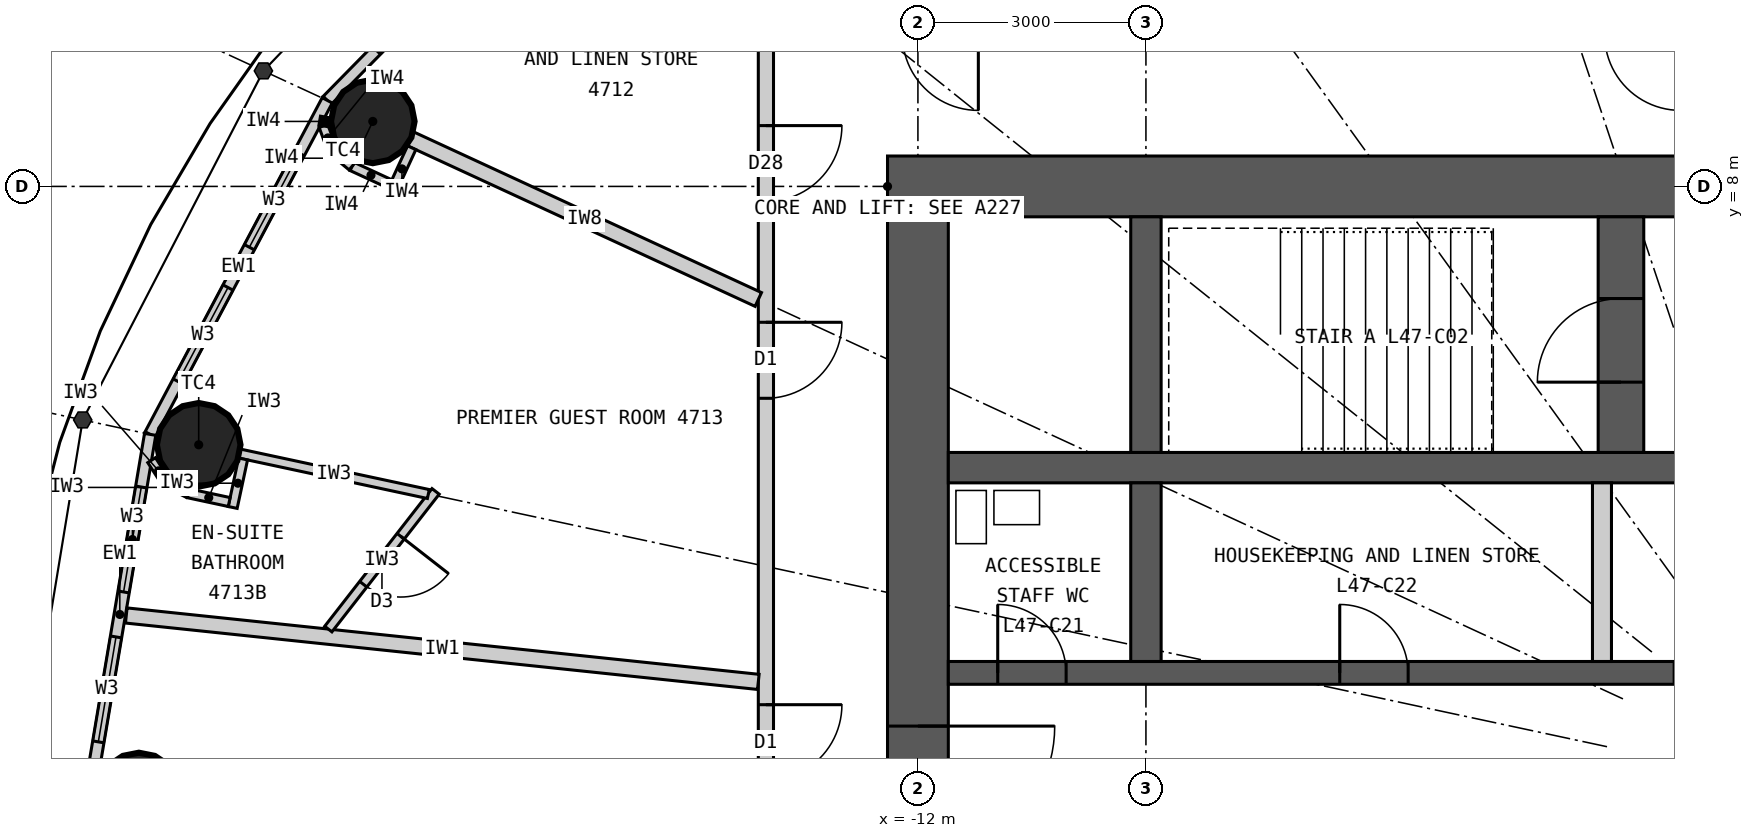
"""IFC4 building model, lengths in metres.
Left out: names, types, materials, properties, quantities, classifications, styles, units other than length and angle.
Written with IfcOpenShell. Run it as: python <this file> out.ifc"""

import sys

from ifc_helpers import new_model, si_unit, direction, frame, frame_2d, origin, origin_2d, place, context, subcontext, project, spatial, rectangle, circle, extrude, element, fill, save


model = new_model("IFC4")
c1 = context("Model", 3, precision=1e-05, world=origin(), true_north=direction((0.0, 1.0)))
c2 = subcontext(c1, "Body", "Model", "MODEL_VIEW")
j1 = project(units=[si_unit("LENGTHUNIT", "METRE"), si_unit("PLANEANGLEUNIT", "RADIAN")], contexts=[c1])
p1 = place(None, origin())
s1 = spatial("IfcSite", under=j1, at=p1, CompositionType="ELEMENT")
p2 = place(p1, origin())
s2 = spatial("IfcBuilding", under=s1, at=p2, CompositionType="ELEMENT")
p3 = place(p2, frame((0.0, 0.0, 176.4)))
s3 = spatial("IfcBuildingStorey", under=s2, at=p3, CompositionType="ELEMENT", Elevation=176.4)
for number, where, z_axis, x_axis in (
    (1, (-19.172, 8.855, 0.0), (0.0, 0.0, 1.0), (1.0, 0.0, 0.0)),
    (2, (-21.463, 4.601, 0.0), (0.0, 0.0, 1.0), (1.0, 0.0, 0.0)),
    (3, (-22.25, 0.0, 0.0), (0.0, 0.0, 1.0), (1.0, 0.0, 0.0)),
):
    element("IfcColumn", number, at=place(p3, frame(where, z_axis=z_axis, x_axis=x_axis)), inside=s3, PredefinedType="COLUMN", context=c2, shape_type="SweptSolid", body=[
        extrude(circle(Radius=0.55, at=origin_2d()), origin(), (0.0, 0.0, 1.0), 3.3),
    ])
p4 = place(p3, frame((-12.4, 8.0, 0.0), z_axis=(0.0, 0.0, 1.0), x_axis=(1.0, 0.0, 0.0)))
e4 = element("IfcWall", 4, at=p4, inside=s3, PredefinedType="SHEAR", context=c2, shape_type="SweptSolid", body=[
    extrude(rectangle(XDim=24.8, YDim=0.8, at=frame_2d((12.4, 0.0))), origin(), (0.0, 0.0, 1.0), 3.3),
])
p5 = place(p4, frame((11.1, 0.0, 0.0)))
e5 = element("IfcOpeningElement", 5, at=p5, cuts=e4, PredefinedType="OPENING", context=c2, shape_type="SweptSolid", body=[
    extrude(rectangle(XDim=1.2, YDim=2.2, at=frame_2d((0.6, 1.1))), frame((0.0, 0.41, 0.0), z_axis=(0.0, -1.0, 0.0), x_axis=(1.0, 0.0, 0.0)), (0.0, 0.0, 1.0), 0.82),
])
p6 = place(p4, frame((18.7, 0.0, 0.0)))
e6 = element("IfcOpeningElement", 6, at=p6, cuts=e4, PredefinedType="OPENING", context=c2, shape_type="SweptSolid", body=[
    extrude(rectangle(XDim=0.9, YDim=2.2, at=frame_2d((0.45, 1.1))), frame((0.0, 0.41, 0.0), z_axis=(0.0, -1.0, 0.0), x_axis=(1.0, 0.0, 0.0)), (0.0, 0.0, 1.0), 0.82),
])
p7 = place(p3, frame((-12.0, 7.6, 0.0), z_axis=(0.0, 0.0, 1.0), x_axis=(0.0, -1.0, 0.0)))
e7 = element("IfcWall", 7, at=p7, inside=s3, PredefinedType="SHEAR", context=c2, shape_type="SweptSolid", body=[
    extrude(rectangle(XDim=15.2, YDim=0.8, at=frame_2d((7.6, 0.0))), origin(), (0.0, 0.0, 1.0), 3.3),
])
p8 = place(p7, frame((6.7, 0.0, 0.0)))
e8 = element("IfcOpeningElement", 8, at=p8, cuts=e7, PredefinedType="OPENING", context=c2, shape_type="SweptSolid", body=[
    extrude(rectangle(XDim=1.8, YDim=2.2, at=frame_2d((0.9, 1.1))), frame((0.0, 0.41, 0.0), z_axis=(0.0, -1.0, 0.0), x_axis=(1.0, 0.0, 0.0)), (0.0, 0.0, 1.0), 0.82),
])
p9 = place(p3, frame((-11.6, 4.3, 0.0), z_axis=(0.0, 0.0, 1.0), x_axis=(1.0, 0.0, 0.0)))
e9 = element("IfcWall", 9, at=p9, inside=s3, PredefinedType="SHEAR", context=c2, shape_type="SweptSolid", body=[
    extrude(rectangle(XDim=23.2, YDim=0.4, at=frame_2d((11.6, 0.0))), origin(), (0.0, 0.0, 1.0), 3.3),
])
p10 = place(p3, frame((-11.6, 1.6, 0.0), z_axis=(0.0, 0.0, 1.0), x_axis=(1.0, 0.0, 0.0)))
e10 = element("IfcWall", 10, at=p10, inside=s3, PredefinedType="SHEAR", context=c2, shape_type="SweptSolid", body=[
    extrude(rectangle(XDim=23.2, YDim=0.3, at=frame_2d((11.6, 0.0))), origin(), (0.0, 0.0, 1.0), 3.3),
])
p11 = place(p10, frame((9.55, 0.0, 0.0)))
e11 = element("IfcOpeningElement", 11, at=p11, cuts=e10, PredefinedType="OPENING", context=c2, shape_type="SweptSolid", body=[
    extrude(rectangle(XDim=1.1, YDim=2.2, at=frame_2d((0.55, 1.1))), frame((0.0, 0.16, 0.0), z_axis=(0.0, -1.0, 0.0), x_axis=(1.0, 0.0, 0.0)), (0.0, 0.0, 1.0), 0.32),
])
p12 = place(p10, frame((12.55, 0.0, 0.0)))
e12 = element("IfcOpeningElement", 12, at=p12, cuts=e10, PredefinedType="OPENING", context=c2, shape_type="SweptSolid", body=[
    extrude(rectangle(XDim=1.1, YDim=2.2, at=frame_2d((0.55, 1.1))), frame((0.0, 0.16, 0.0), z_axis=(0.0, -1.0, 0.0), x_axis=(1.0, 0.0, 0.0)), (0.0, 0.0, 1.0), 0.32),
])
p13 = place(p10, frame((0.65, 0.0, 0.0)))
e13 = element("IfcOpeningElement", 13, at=p13, cuts=e10, PredefinedType="OPENING", context=c2, shape_type="SweptSolid", body=[
    extrude(rectangle(XDim=0.9, YDim=2.2, at=frame_2d((0.45, 1.1))), frame((0.0, 0.16, 0.0), z_axis=(0.0, -1.0, 0.0), x_axis=(1.0, 0.0, 0.0)), (0.0, 0.0, 1.0), 0.32),
])
p14 = place(p10, frame((5.15, 0.0, 0.0)))
e14 = element("IfcOpeningElement", 14, at=p14, cuts=e10, PredefinedType="OPENING", context=c2, shape_type="SweptSolid", body=[
    extrude(rectangle(XDim=0.9, YDim=2.2, at=frame_2d((0.45, 1.1))), frame((0.0, 0.16, 0.0), z_axis=(0.0, -1.0, 0.0), x_axis=(1.0, 0.0, 0.0)), (0.0, 0.0, 1.0), 0.32),
])
p15 = place(p10, frame((21.65, 0.0, 0.0)))
e15 = element("IfcOpeningElement", 15, at=p15, cuts=e10, PredefinedType="OPENING", context=c2, shape_type="SweptSolid", body=[
    extrude(rectangle(XDim=0.9, YDim=2.2, at=frame_2d((0.45, 1.1))), frame((0.0, 0.16, 0.0), z_axis=(0.0, -1.0, 0.0), x_axis=(1.0, 0.0, 0.0)), (0.0, 0.0, 1.0), 0.32),
])
p16 = place(p3, frame((-9.0, 4.5, 0.0), z_axis=(0.0, 0.0, 1.0), x_axis=(0.0, 1.0, 0.0)))
e16 = element("IfcWall", 16, at=p16, inside=s3, PredefinedType="SHEAR", context=c2, shape_type="SweptSolid", body=[
    extrude(rectangle(XDim=3.1, YDim=0.4, at=frame_2d((1.55, 0.0))), origin(), (0.0, 0.0, 1.0), 3.3),
])
p17 = place(p3, frame((-9.0, 1.75, 0.0), z_axis=(0.0, 0.0, 1.0), x_axis=(0.0, 1.0, 0.0)))
e17 = element("IfcWall", 17, at=p17, inside=s3, PredefinedType="SHEAR", context=c2, shape_type="SweptSolid", body=[
    extrude(rectangle(XDim=2.35, YDim=0.4, at=frame_2d((1.175, 0.0))), origin(), (0.0, 0.0, 1.0), 3.3),
])
p18 = place(p3, frame((-2.75, 4.5, 0.0), z_axis=(0.0, 0.0, 1.0), x_axis=(0.0, 1.0, 0.0)))
e18 = element("IfcWall", 18, at=p18, inside=s3, PredefinedType="SHEAR", context=c2, shape_type="SweptSolid", body=[
    extrude(rectangle(XDim=3.1, YDim=0.6, at=frame_2d((1.55, 0.0))), origin(), (0.0, 0.0, 1.0), 3.3),
])
p19 = place(p18, frame((0.925, 0.0, 0.0)))
e19 = element("IfcOpeningElement", 19, at=p19, cuts=e18, PredefinedType="OPENING", context=c2, shape_type="SweptSolid", body=[
    extrude(rectangle(XDim=1.1, YDim=2.2, at=frame_2d((0.55, 1.1))), frame((0.0, 0.31, 0.0), z_axis=(0.0, -1.0, 0.0), x_axis=(1.0, 0.0, 0.0)), (0.0, 0.0, 1.0), 0.62),
])
p20 = place(p3, frame((-3.0, 1.75, 0.0), z_axis=(0.0, 0.0, 1.0), x_axis=(0.0, 1.0, 0.0)))
e20 = element("IfcWall", 20, at=p20, inside=s3, PredefinedType="PARTITIONING", context=c2, shape_type="SweptSolid", body=[
    extrude(rectangle(XDim=2.35, YDim=0.25, at=frame_2d((1.175, 0.0))), origin(), (0.0, 0.0, 1.0), 3.3),
])
p21 = place(p3, frame((-16.095, 12.876, 0.0), z_axis=(0.0, 0.0, 1.0), x_axis=(-0.700727467776, -0.71342905457, 0.0)))
e21 = element("IfcWall", 21, at=p21, inside=s3, PredefinedType="ELEMENTEDWALL", context=c2, shape_type="SweptSolid", body=[
    extrude(rectangle(XDim=5.247, YDim=0.15, at=frame_2d((2.624, 0.0))), origin(), (0.0, 0.0, 1.0), 3.12),
])
p22 = place(p21, frame((0.924, 0.0, 0.9)))
e22 = element("IfcOpeningElement", 22, at=p22, cuts=e21, PredefinedType="OPENING", context=c2, shape_type="SweptSolid", body=[
    extrude(rectangle(XDim=1.4, YDim=1.9, at=frame_2d((0.7, 0.95))), frame((0.0, 0.085, 0.0), z_axis=(0.0, -1.0, 0.0), x_axis=(1.0, 0.0, 0.0)), (0.0, 0.0, 1.0), 0.17),
])
p23 = place(p21, frame((2.924, 0.0, 0.9)))
e23 = element("IfcOpeningElement", 23, at=p23, cuts=e21, PredefinedType="OPENING", context=c2, shape_type="SweptSolid", body=[
    extrude(rectangle(XDim=1.4, YDim=1.9, at=frame_2d((0.7, 0.95))), frame((0.0, 0.085, 0.0), z_axis=(0.0, -1.0, 0.0), x_axis=(1.0, 0.0, 0.0)), (0.0, 0.0, 1.0), 0.17),
])
p24 = place(p3, frame((-19.772, 9.132, 0.0), z_axis=(0.0, 0.0, 1.0), x_axis=(-0.468428906714, -0.883501193748, 0.0)))
e24 = element("IfcWall", 24, at=p24, inside=s3, PredefinedType="ELEMENTEDWALL", context=c2, shape_type="SweptSolid", body=[
    extrude(rectangle(XDim=4.974, YDim=0.15, at=frame_2d((2.487, 0.0))), origin(), (0.0, 0.0, 1.0), 3.12),
])
p25 = place(p24, frame((0.787, 0.0, 0.9)))
e25 = element("IfcOpeningElement", 25, at=p25, cuts=e24, PredefinedType="OPENING", context=c2, shape_type="SweptSolid", body=[
    extrude(rectangle(XDim=1.4, YDim=1.9, at=frame_2d((0.7, 0.95))), frame((0.0, 0.085, 0.0), z_axis=(0.0, -1.0, 0.0), x_axis=(1.0, 0.0, 0.0)), (0.0, 0.0, 1.0), 0.17),
])
p26 = place(p24, frame((2.787, 0.0, 0.9)))
e26 = element("IfcOpeningElement", 26, at=p26, cuts=e24, PredefinedType="OPENING", context=c2, shape_type="SweptSolid", body=[
    extrude(rectangle(XDim=1.4, YDim=1.9, at=frame_2d((0.7, 0.95))), frame((0.0, 0.085, 0.0), z_axis=(0.0, -1.0, 0.0), x_axis=(1.0, 0.0, 0.0)), (0.0, 0.0, 1.0), 0.17),
])
p27 = place(p3, frame((-22.102, 4.738, 0.0), z_axis=(0.0, 0.0, 1.0), x_axis=(-0.166162111254, -0.986098449843, 0.0)))
e27 = element("IfcWall", 27, at=p27, inside=s3, PredefinedType="ELEMENTEDWALL", context=c2, shape_type="SweptSolid", body=[
    extrude(rectangle(XDim=4.805, YDim=0.15, at=frame_2d((2.402, 0.0))), origin(), (0.0, 0.0, 1.0), 3.12),
])
p28 = place(p27, frame((0.702, 0.0, 0.9)))
e28 = element("IfcOpeningElement", 28, at=p28, cuts=e27, PredefinedType="OPENING", context=c2, shape_type="SweptSolid", body=[
    extrude(rectangle(XDim=1.4, YDim=1.9, at=frame_2d((0.7, 0.95))), frame((0.0, 0.085, 0.0), z_axis=(0.0, -1.0, 0.0), x_axis=(1.0, 0.0, 0.0)), (0.0, 0.0, 1.0), 0.17),
])
p29 = place(p27, frame((2.702, 0.0, 0.9)))
e29 = element("IfcOpeningElement", 29, at=p29, cuts=e27, PredefinedType="OPENING", context=c2, shape_type="SweptSolid", body=[
    extrude(rectangle(XDim=1.4, YDim=1.9, at=frame_2d((0.7, 0.95))), frame((0.0, 0.085, 0.0), z_axis=(0.0, -1.0, 0.0), x_axis=(1.0, 0.0, 0.0)), (0.0, 0.0, 1.0), 0.17),
])
p30 = place(p3, frame((-14.0, 9.9, 0.0), z_axis=(0.0, 0.0, 1.0), x_axis=(0.0, -1.0, 0.0)))
e30 = element("IfcWall", 30, at=p30, inside=s3, PredefinedType="PARTITIONING", context=c2, shape_type="SweptSolid", body=[
    extrude(rectangle(XDim=19.8, YDim=0.2, at=frame_2d((9.9, 0.0))), origin(), (0.0, 0.0, 1.0), 3.12),
])
p31 = place(p30, frame((13.853, 0.0, 0.0)))
e31 = element("IfcOpeningElement", 31, at=p31, cuts=e30, PredefinedType="OPENING", context=c2, shape_type="SweptSolid", body=[
    extrude(rectangle(XDim=1.0, YDim=2.2, at=frame_2d((0.5, 1.1))), frame((0.0, 0.11, 0.0), z_axis=(0.0, -1.0, 0.0), x_axis=(1.0, 0.0, 0.0)), (0.0, 0.0, 1.0), 0.22),
])
p32 = place(p30, frame((1.1, 0.0, 0.0)))
e32 = element("IfcOpeningElement", 32, at=p32, cuts=e30, PredefinedType="OPENING", context=c2, shape_type="SweptSolid", body=[
    extrude(rectangle(XDim=1.0, YDim=2.2, at=frame_2d((0.5, 1.1))), frame((0.0, 0.11, 0.0), z_axis=(0.0, -1.0, 0.0), x_axis=(1.0, 0.0, 0.0)), (0.0, 0.0, 1.0), 0.22),
])
p33 = place(p30, frame((3.688, 0.0, 0.0)))
e33 = element("IfcOpeningElement", 33, at=p33, cuts=e30, PredefinedType="OPENING", context=c2, shape_type="SweptSolid", body=[
    extrude(rectangle(XDim=1.0, YDim=2.2, at=frame_2d((0.5, 1.1))), frame((0.0, 0.11, 0.0), z_axis=(0.0, -1.0, 0.0), x_axis=(1.0, 0.0, 0.0)), (0.0, 0.0, 1.0), 0.22),
])
p34 = place(p30, frame((8.719, 0.0, 0.0)))
e34 = element("IfcOpeningElement", 34, at=p34, cuts=e30, PredefinedType="OPENING", context=c2, shape_type="SweptSolid", body=[
    extrude(rectangle(XDim=1.0, YDim=2.2, at=frame_2d((0.5, 1.1))), frame((0.0, 0.11, 0.0), z_axis=(0.0, -1.0, 0.0), x_axis=(1.0, 0.0, 0.0)), (0.0, 0.0, 1.0), 0.22),
])
p35 = place(p3, frame((-14.1, 6.512, 0.0), z_axis=(0.0, 0.0, 1.0), x_axis=(-0.907823150669, 0.419353224751, 0.0)))
e35 = element("IfcWall", 35, at=p35, inside=s3, PredefinedType="PARTITIONING", context=c2, shape_type="SweptSolid", body=[
    extrude(rectangle(XDim=5.037, YDim=0.2, at=frame_2d((2.519, 0.0))), origin(), (0.0, 0.0, 1.0), 2.32),
])
p36 = place(p3, frame((-14.1, 1.481, 0.0), z_axis=(0.0, 0.0, 1.0), x_axis=(-0.994524794819, 0.104500873159, 0.0)))
e36 = element("IfcWall", 36, at=p36, inside=s3, PredefinedType="PARTITIONING", context=c2, shape_type="SweptSolid", body=[
    extrude(rectangle(XDim=8.362, YDim=0.2, at=frame_2d((4.181, 0.0))), origin(), (0.0, 0.0, 1.0), 2.47),
])
p37 = place(p3, frame((-19.758, 2.177, 0.0), z_axis=(0.0, 0.0, 1.0), x_axis=(0.614713147302, 0.788750750576, 0.0)))
e37 = element("IfcWall", 37, at=p37, inside=s3, PredefinedType="PARTITIONING", context=c2, shape_type="SweptSolid", body=[
    extrude(rectangle(XDim=2.296, YDim=0.12, at=frame_2d((1.148, 0.0))), origin(), (0.0, 0.0, 1.0), 3.12),
])
p38 = place(p37, frame((0.748, 0.0, 0.0)))
e38 = element("IfcOpeningElement", 38, at=p38, cuts=e37, PredefinedType="OPENING", context=c2, shape_type="SweptSolid", body=[
    extrude(rectangle(XDim=0.8, YDim=2.1, at=frame_2d((0.4, 1.05))), frame((0.0, 0.07, 0.0), z_axis=(0.0, -1.0, 0.0), x_axis=(1.0, 0.0, 0.0)), (0.0, 0.0, 1.0), 0.14),
])
p39 = place(p3, frame((-18.441, 3.953, 0.0), z_axis=(0.0, 0.0, 1.0), x_axis=(-0.977801007461, 0.209535652833, 0.0)))
e39 = element("IfcWall", 39, at=p39, inside=s3, PredefinedType="PARTITIONING", context=c2, shape_type="SweptSolid", body=[
    extrude(rectangle(XDim=2.54, YDim=0.12, at=frame_2d((1.27, 0.0))), origin(), (0.0, 0.0, 1.0), 2.42),
])
p40 = place(p3, frame((-20.879, 4.414, 0.0), z_axis=(0.0, 0.0, 1.0), x_axis=(-0.209554644104, -0.977796937577, 0.0)))
e40 = element("IfcWall", 40, at=p40, inside=s3, PredefinedType="PARTITIONING", context=c2, shape_type="SweptSolid", body=[
    extrude(rectangle(XDim=0.652, YDim=0.12, at=frame_2d((0.326, 0.0))), origin(), (0.0, 0.0, 1.0), 3.12),
])
p41 = place(p3, frame((-21.062, 3.848, 0.0), z_axis=(0.0, 0.0, 1.0), x_axis=(-0.977789415726, 0.209589738521, 0.0)))
e41 = element("IfcWall", 41, at=p41, inside=s3, PredefinedType="PARTITIONING", context=c2, shape_type="SweptSolid", body=[
    extrude(rectangle(XDim=0.55, YDim=0.12, at=frame_2d((0.275, 0.0))), origin(), (0.0, 0.0, 1.0), 3.12),
])
p42 = place(p3, frame((-21.599, 3.963, 0.0), z_axis=(0.0, 0.0, 1.0), x_axis=(-0.890193602875, 0.455582428766, 0.0)))
e42 = element("IfcWall", 42, at=p42, inside=s3, PredefinedType="PARTITIONING", context=c2, shape_type="SweptSolid", body=[
    extrude(rectangle(XDim=0.338, YDim=0.12, at=frame_2d((0.169, 0.0))), origin(), (0.0, 0.0, 1.0), 3.12),
])
p43 = place(p3, frame((-21.9, 4.117, 0.0), z_axis=(0.0, 0.0, 1.0), x_axis=(-0.543582688681, 0.839355622228, 0.0)))
e43 = element("IfcWall", 43, at=p43, inside=s3, PredefinedType="PARTITIONING", context=c2, shape_type="SweptSolid", body=[
    extrude(rectangle(XDim=0.336, YDim=0.12, at=frame_2d((0.168, 0.0))), origin(), (0.0, 0.0, 1.0), 3.12),
])
p44 = place(p3, frame((-18.66, 8.509, 0.0), z_axis=(0.0, 0.0, 1.0), x_axis=(-0.419083463716, -0.907947713494, 0.0)))
e44 = element("IfcWall", 44, at=p44, inside=s3, PredefinedType="PARTITIONING", context=c2, shape_type="SweptSolid", body=[
    extrude(rectangle(XDim=0.612, YDim=0.12, at=frame_2d((0.306, 0.0))), origin(), (0.0, 0.0, 1.0), 3.12),
])
p45 = place(p3, frame((-18.946, 8.032, 0.0), z_axis=(0.0, 0.0, 1.0), x_axis=(-0.907842467956, 0.419311403822, 0.0)))
e45 = element("IfcWall", 45, at=p45, inside=s3, PredefinedType="PARTITIONING", context=c2, shape_type="SweptSolid", body=[
    extrude(rectangle(XDim=0.55, YDim=0.12, at=frame_2d((0.275, 0.0))), origin(), (0.0, 0.0, 1.0), 3.12),
])
p46 = place(p3, frame((-19.446, 8.263, 0.0), z_axis=(0.0, 0.0, 1.0), x_axis=(-0.768221279597, 0.640184399664, 0.0)))
e46 = element("IfcWall", 46, at=p46, inside=s3, PredefinedType="PARTITIONING", context=c2, shape_type="SweptSolid", body=[
    extrude(rectangle(XDim=0.337, YDim=0.12, at=frame_2d((0.169, 0.0))), origin(), (0.0, 0.0, 1.0), 3.12),
])
p47 = place(p3, frame((-19.705, 8.479, 0.0), z_axis=(0.0, 0.0, 1.0), x_axis=(-0.345571344575, 0.938392479621, 0.0)))
e47 = element("IfcWall", 47, at=p47, inside=s3, PredefinedType="PARTITIONING", context=c2, shape_type="SweptSolid", body=[
    extrude(rectangle(XDim=0.338, YDim=0.12, at=frame_2d((0.169, 0.0))), origin(), (0.0, 0.0, 1.0), 3.12),
])
p48 = place(p3, frame((-19.822, 8.796, 0.0), z_axis=(0.0, 0.0, 1.0), x_axis=(0.169701508781, 0.985495508827, 0.0)))
e48 = element("IfcWall", 48, at=p48, inside=s3, PredefinedType="PARTITIONING", context=c2, shape_type="SweptSolid", body=[
    extrude(rectangle(XDim=0.119, YDim=0.12, at=frame_2d((0.06, 0.0))), origin(), (0.0, 0.0, 1.0), 3.12),
])
p49 = place(p25, origin())
e49 = element("IfcWindow", 49, at=p49, inside=s3, PartitioningType="SINGLE_PANEL", PredefinedType="WINDOW", context=c2, shape_type="SweptSolid", body=[
    extrude(rectangle(XDim=1.4, YDim=1.9, at=frame_2d((0.7, 0.95))), frame((0.0, 0.03, 0.0), z_axis=(0.0, -1.0, 0.0), x_axis=(1.0, 0.0, 0.0)), (0.0, 0.0, 1.0), 0.06),
])
fill(e25, e49)
p50 = place(p26, origin())
e50 = element("IfcWindow", 50, at=p50, inside=s3, PartitioningType="SINGLE_PANEL", PredefinedType="WINDOW", context=c2, shape_type="SweptSolid", body=[
    extrude(rectangle(XDim=1.4, YDim=1.9, at=frame_2d((0.7, 0.95))), frame((0.0, 0.03, 0.0), z_axis=(0.0, -1.0, 0.0), x_axis=(1.0, 0.0, 0.0)), (0.0, 0.0, 1.0), 0.06),
])
fill(e26, e50)
p51 = place(p28, origin())
e51 = element("IfcWindow", 51, at=p51, inside=s3, PartitioningType="SINGLE_PANEL", PredefinedType="WINDOW", context=c2, shape_type="SweptSolid", body=[
    extrude(rectangle(XDim=1.4, YDim=1.9, at=frame_2d((0.7, 0.95))), frame((0.0, 0.03, 0.0), z_axis=(0.0, -1.0, 0.0), x_axis=(1.0, 0.0, 0.0)), (0.0, 0.0, 1.0), 0.06),
])
fill(e28, e51)
p52 = place(p29, origin())
e52 = element("IfcWindow", 52, at=p52, inside=s3, PartitioningType="SINGLE_PANEL", PredefinedType="WINDOW", context=c2, shape_type="SweptSolid", body=[
    extrude(rectangle(XDim=1.4, YDim=1.9, at=frame_2d((0.7, 0.95))), frame((0.0, 0.03, 0.0), z_axis=(0.0, -1.0, 0.0), x_axis=(1.0, 0.0, 0.0)), (0.0, 0.0, 1.0), 0.06),
])
fill(e29, e52)
p53 = place(p32, origin())
e53 = element("IfcDoor", 53, at=p53, inside=s3, OperationType="SINGLE_SWING_LEFT", PredefinedType="DOOR", context=c2, shape_type="SweptSolid", body=[
    extrude(rectangle(XDim=1.0, YDim=2.2, at=frame_2d((0.5, 1.1))), frame((0.0, 0.025, 0.0), z_axis=(0.0, -1.0, 0.0), x_axis=(1.0, 0.0, 0.0)), (0.0, 0.0, 1.0), 0.05),
])
fill(e32, e53)
p54 = place(p38, origin())
e54 = element("IfcDoor", 54, at=p54, inside=s3, OperationType="SINGLE_SWING_RIGHT", PredefinedType="DOOR", context=c2, shape_type="SweptSolid", body=[
    extrude(rectangle(XDim=0.8, YDim=2.1, at=frame_2d((0.4, 1.05))), frame((0.0, 0.025, 0.0), z_axis=(0.0, -1.0, 0.0), x_axis=(1.0, 0.0, 0.0)), (0.0, 0.0, 1.0), 0.05),
])
fill(e38, e54)
p55 = place(p33, origin())
e55 = element("IfcDoor", 55, at=p55, inside=s3, OperationType="SINGLE_SWING_LEFT", PredefinedType="DOOR", context=c2, shape_type="SweptSolid", body=[
    extrude(rectangle(XDim=1.0, YDim=2.2, at=frame_2d((0.5, 1.1))), frame((0.0, 0.025, 0.0), z_axis=(0.0, -1.0, 0.0), x_axis=(1.0, 0.0, 0.0)), (0.0, 0.0, 1.0), 0.05),
])
fill(e33, e55)
p56 = place(p34, origin())
e56 = element("IfcDoor", 56, at=p56, inside=s3, OperationType="SINGLE_SWING_LEFT", PredefinedType="DOOR", context=c2, shape_type="SweptSolid", body=[
    extrude(rectangle(XDim=1.0, YDim=2.2, at=frame_2d((0.5, 1.1))), frame((0.0, 0.025, 0.0), z_axis=(0.0, -1.0, 0.0), x_axis=(1.0, 0.0, 0.0)), (0.0, 0.0, 1.0), 0.05),
])
fill(e34, e56)
p57 = place(p19, origin())
e57 = element("IfcDoor", 57, at=p57, inside=s3, OperationType="SINGLE_SWING_LEFT", PredefinedType="DOOR", context=c2, shape_type="SweptSolid", body=[
    extrude(rectangle(XDim=1.1, YDim=2.2, at=frame_2d((0.55, 1.1))), frame((0.0, 0.025, 0.0), z_axis=(0.0, -1.0, 0.0), x_axis=(1.0, 0.0, 0.0)), (0.0, 0.0, 1.0), 0.05),
])
fill(e19, e57)
p58 = place(p13, origin())
e58 = element("IfcDoor", 58, at=p58, inside=s3, OperationType="SINGLE_SWING_LEFT", PredefinedType="DOOR", context=c2, shape_type="SweptSolid", body=[
    extrude(rectangle(XDim=0.9, YDim=2.2, at=frame_2d((0.45, 1.1))), frame((0.0, 0.025, 0.0), z_axis=(0.0, -1.0, 0.0), x_axis=(1.0, 0.0, 0.0)), (0.0, 0.0, 1.0), 0.05),
])
fill(e13, e58)
p59 = place(p14, origin())
e59 = element("IfcDoor", 59, at=p59, inside=s3, OperationType="SINGLE_SWING_LEFT", PredefinedType="DOOR", context=c2, shape_type="SweptSolid", body=[
    extrude(rectangle(XDim=0.9, YDim=2.2, at=frame_2d((0.45, 1.1))), frame((0.0, 0.025, 0.0), z_axis=(0.0, -1.0, 0.0), x_axis=(1.0, 0.0, 0.0)), (0.0, 0.0, 1.0), 0.05),
])
fill(e14, e59)
p60 = place(p8, origin())
e60 = element("IfcDoor", 60, at=p60, inside=s3, OperationType="DOUBLE_DOOR_DOUBLE_SWING", PredefinedType="DOOR", context=c2, shape_type="SweptSolid", body=[
    extrude(rectangle(XDim=1.8, YDim=2.2, at=frame_2d((0.9, 1.1))), frame((0.0, 0.025, 0.0), z_axis=(0.0, -1.0, 0.0), x_axis=(1.0, 0.0, 0.0)), (0.0, 0.0, 1.0), 0.05),
])
fill(e8, e60)
save(model, sys.argv[1])
